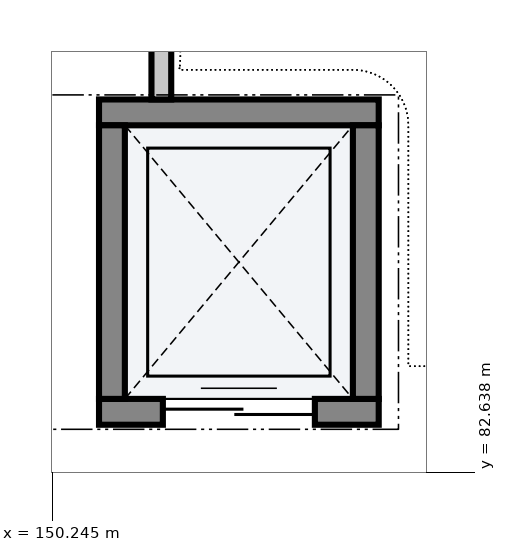
"""IFC4 building model, lengths in metres.
Left out: names, types, materials, properties, quantities, classifications, styles, units other than length and angle.
Written with IfcOpenShell. Run it as: python <this file> out.ifc"""

import sys

from ifc_helpers import new_model, si_unit, direction, frame, frame_2d, origin, place, context, subcontext, project, spatial, rectangle, extrude, element, fill, save


model = new_model("IFC4")
c1 = context("Model", 3, precision=1e-05, world=origin(), true_north=direction((0.0, 1.0)))
c2 = subcontext(c1, "Body", "Model", "MODEL_VIEW")
j1 = project(units=[si_unit("LENGTHUNIT", "METRE"), si_unit("PLANEANGLEUNIT", "RADIAN")], contexts=[c1])
p1 = place(None, origin())
s1 = spatial("IfcSite", under=j1, at=p1, CompositionType="ELEMENT")
p2 = place(p1, origin())
s2 = spatial("IfcBuilding", under=s1, at=p2, CompositionType="ELEMENT")
p3 = place(p2, frame((0.0, 0.0, -4.8)))
s3 = spatial("IfcBuildingStorey", under=s2, at=p3, CompositionType="ELEMENT", Elevation=-4.8)
p4 = place(p3, frame((150.86, 83.43, 0.0), z_axis=(0.0, 0.0, 1.0), x_axis=(1.0, 0.0, 0.0)))
e1 = element("IfcWall", 1, at=p4, inside=s3, PredefinedType="SHEAR", context=c2, shape_type="SweptSolid", body=[
    extrude(rectangle(XDim=3.68, YDim=0.34, at=frame_2d((1.84, 0.0))), origin(), (0.0, 0.0, 1.0), 4.5),
])
p5 = place(p4, frame((0.84, 0.0, 0.0)))
e2 = element("IfcOpeningElement", 2, at=p5, cuts=e1, PredefinedType="OPENING", context=c2, shape_type="SweptSolid", body=[
    extrude(rectangle(XDim=2.0, YDim=2.4, at=frame_2d((1.0, 1.2))), frame((0.0, 0.182, 0.0), z_axis=(0.0, -1.0, 0.0), x_axis=(1.0, 0.0, 0.0)), (0.0, 0.0, 1.0), 0.364),
])
p6 = place(p3, frame((150.86, 87.37, 0.0), z_axis=(0.0, 0.0, 1.0), x_axis=(1.0, 0.0, 0.0)))
e3 = element("IfcWall", 3, at=p6, inside=s3, PredefinedType="SHEAR", context=c2, shape_type="SweptSolid", body=[
    extrude(rectangle(XDim=3.68, YDim=0.34, at=frame_2d((1.84, 0.0))), origin(), (0.0, 0.0, 1.0), 4.5),
])
for number, where, z_axis, x_axis in (
    (4, (151.03, 83.6, 0.0), (0.0, 0.0, 1.0), (0.0, 1.0, 0.0)),
    (5, (154.37, 83.6, 0.0), (0.0, 0.0, 1.0), (0.0, 1.0, 0.0)),
):
    element("IfcWall", number, at=place(p3, frame(where, z_axis=z_axis, x_axis=x_axis)), inside=s3, PredefinedType="SHEAR", context=c2, shape_type="SweptSolid", body=[
        extrude(rectangle(XDim=3.6, YDim=0.34, at=frame_2d((1.8, 0.0))), origin(), (0.0, 0.0, 1.0), 4.5),
    ])
p7 = place(p3, frame((151.68, 87.54, 0.0), z_axis=(0.0, 0.0, 1.0), x_axis=(0.0, 1.0, 0.0)))
e6 = element("IfcWall", 6, at=p7, inside=s3, PredefinedType="PARTITIONING", context=c2, shape_type="SweptSolid", body=[
    extrude(rectangle(XDim=10.74, YDim=0.26, at=frame_2d((5.37, 0.0))), origin(), (0.0, 0.0, 1.0), 3.44),
])
p8 = place(p7, frame((4.851, 0.0, 0.0)))
e7 = element("IfcOpeningElement", 7, at=p8, cuts=e6, PredefinedType="OPENING", context=c2, shape_type="SweptSolid", body=[
    extrude(rectangle(XDim=1.6, YDim=2.3, at=frame_2d((0.8, 1.15))), frame((0.0, 0.142, 0.0), z_axis=(0.0, -1.0, 0.0), x_axis=(1.0, 0.0, 0.0)), (0.0, 0.0, 1.0), 0.284),
])
p9 = place(p5, origin())
e8 = element("IfcDoor", 8, at=p9, inside=s3, OperationType="DOUBLE_DOOR_SLIDING", PredefinedType="DOOR", context=c2, shape_type="SweptSolid", body=[
    extrude(rectangle(XDim=2.0, YDim=2.4, at=frame_2d((1.0, 1.2))), frame((0.0, 0.025, 0.0), z_axis=(0.0, -1.0, 0.0), x_axis=(1.0, 0.0, 0.0)), (0.0, 0.0, 1.0), 0.05),
])
fill(e2, e8)
save(model, sys.argv[1])
